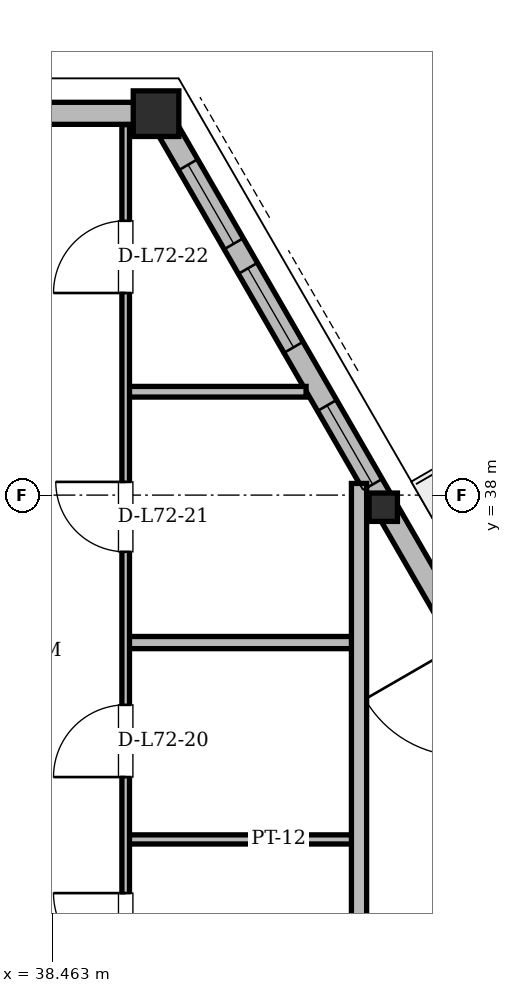
"""IFC4 building model, lengths in metres.
Left out: names, types, materials, properties, quantities, classifications, styles, units other than length and angle.
Written with IfcOpenShell. Run it as: python <this file> out.ifc"""

import sys

from ifc_helpers import new_model, si_unit, direction, frame, frame_2d, origin, origin_2d, place, context, subcontext, project, spatial, rectangle, hollow_rectangle, i_section, extrude, element, fill, save


model = new_model("IFC4")
c1 = context("Model", 3, precision=1e-05, world=origin(), true_north=direction((0.0, 1.0)))
c2 = subcontext(c1, "Body", "Model", "MODEL_VIEW")
j1 = project(units=[si_unit("LENGTHUNIT", "METRE"), si_unit("PLANEANGLEUNIT", "RADIAN")], contexts=[c1])
p1 = place(None, origin())
s1 = spatial("IfcSite", under=j1, at=p1, CompositionType="ELEMENT")
p2 = place(p1, origin())
s2 = spatial("IfcBuilding", under=s1, at=p2, CompositionType="ELEMENT")
p3 = place(p2, frame((0.0, 0.0, 273.3)))
s3 = spatial("IfcBuildingStorey", under=s2, at=p3, CompositionType="ELEMENT", Elevation=273.3)
p4 = place(p3, frame((39.861, 43.023, 0.004), z_axis=(-0.016060121522, -0.002446659138, 0.99986803447), x_axis=(0.150606094644, -0.988593852022, 0.0)))
e1 = element("IfcColumn", 1, at=p4, inside=s3, PredefinedType="COLUMN", context=c2, shape_type="SweptSolid", body=[
    extrude(hollow_rectangle(XDim=0.6, YDim=0.6, WallThickness=0.045, at=origin_2d()), origin(), (0.0, 0.0, 1.0), 3.892),
])
p5 = place(p3, frame((42.848, 37.848, 0.004), z_axis=(-0.01518196499, -0.004015065121, 0.999876685992), x_axis=(0.255672947806, -0.966763333893, 0.0)))
e2 = element("IfcColumn", 2, at=p5, inside=s3, PredefinedType="COLUMN", context=c2, shape_type="SweptSolid", body=[
    extrude(i_section(OverallWidth=0.373, OverallDepth=0.373, WebThickness=0.016, FlangeThickness=0.026, at=origin_2d()), origin(), (0.0, 0.0, 1.0), 3.892),
])
p6 = place(p3, frame((58.532, 10.683, 0.0), z_axis=(0.0, 0.0, 1.0), x_axis=(-0.499999381892, 0.866025760649, 0.0)))
e3 = element("IfcWall", 3, at=p6, inside=s3, PredefinedType="SOLIDWALL", context=c2, shape_type="SweptSolid", body=[
    extrude(rectangle(XDim=37.343, YDim=0.29, at=frame_2d((18.671, 0.0))), origin(), (0.0, 0.0, 1.0), 3.058),
])
p7 = place(p6, frame((6.789, 0.0, 0.0)))
e4 = element("IfcOpeningElement", 4, at=p7, cuts=e3, PredefinedType="OPENING", context=c2, shape_type="SweptSolid", body=[
    extrude(rectangle(XDim=1.5, YDim=2.2, at=frame_2d((0.75, 1.1))), frame((0.0, 0.145, 0.0), z_axis=(0.0, -1.0, 0.0), x_axis=(1.0, 0.0, 0.0)), (0.0, 0.0, 1.0), 0.29),
])
p8 = place(p6, frame((27.808, 0.0, 0.0)))
e5 = element("IfcOpeningElement", 5, at=p8, cuts=e3, PredefinedType="OPENING", context=c2, shape_type="SweptSolid", body=[
    extrude(rectangle(XDim=1.5, YDim=2.2, at=frame_2d((0.75, 1.1))), frame((0.0, 0.145, 0.0), z_axis=(0.0, -1.0, 0.0), x_axis=(1.0, 0.0, 0.0)), (0.0, 0.0, 1.0), 0.29),
])
p9 = place(p6, frame((0.901, 0.0, 0.85)))
e6 = element("IfcOpeningElement", 6, at=p9, cuts=e3, PredefinedType="OPENING", context=c2, shape_type="SweptSolid", body=[
    extrude(rectangle(XDim=1.2, YDim=1.48, at=frame_2d((0.6, 0.74))), frame((0.0, 0.145, 0.0), z_axis=(0.0, -1.0, 0.0), x_axis=(1.0, 0.0, 0.0)), (0.0, 0.0, 1.0), 0.29),
])
p10 = place(p6, frame((12.688, 0.0, 0.85)))
e7 = element("IfcOpeningElement", 7, at=p10, cuts=e3, PredefinedType="OPENING", context=c2, shape_type="SweptSolid", body=[
    extrude(rectangle(XDim=3.0, YDim=2.098, at=frame_2d((1.5, 1.049))), frame((0.0, 0.145, 0.0), z_axis=(0.0, -1.0, 0.0), x_axis=(1.0, 0.0, 0.0)), (0.0, 0.0, 1.0), 0.29),
])
p11 = place(p6, frame((17.814, 0.0, 0.85)))
e8 = element("IfcOpeningElement", 8, at=p11, cuts=e3, PredefinedType="OPENING", context=c2, shape_type="SweptSolid", body=[
    extrude(rectangle(XDim=2.6, YDim=1.95, at=frame_2d((1.3, 0.975))), frame((0.0, 0.145, 0.0), z_axis=(0.0, -1.0, 0.0), x_axis=(1.0, 0.0, 0.0)), (0.0, 0.0, 1.0), 0.29),
])
p12 = place(p6, frame((35.362, 0.0, 0.85)))
e9 = element("IfcOpeningElement", 9, at=p12, cuts=e3, PredefinedType="OPENING", context=c2, shape_type="SweptSolid", body=[
    extrude(rectangle(XDim=1.2, YDim=1.48, at=frame_2d((0.6, 0.74))), frame((0.0, 0.145, 0.0), z_axis=(0.0, -1.0, 0.0), x_axis=(1.0, 0.0, 0.0)), (0.0, 0.0, 1.0), 0.29),
])
p13 = place(p6, frame((33.788, 0.0, 0.85)))
e10 = element("IfcOpeningElement", 10, at=p13, cuts=e3, PredefinedType="OPENING", context=c2, shape_type="SweptSolid", body=[
    extrude(rectangle(XDim=1.2, YDim=1.48, at=frame_2d((0.6, 0.74))), frame((0.0, 0.145, 0.0), z_axis=(0.0, -1.0, 0.0), x_axis=(1.0, 0.0, 0.0)), (0.0, 0.0, 1.0), 0.29),
])
p14 = place(p6, frame((22.74, 0.0, 0.85)))
e11 = element("IfcOpeningElement", 11, at=p14, cuts=e3, PredefinedType="OPENING", context=c2, shape_type="SweptSolid", body=[
    extrude(rectangle(XDim=1.2, YDim=1.48, at=frame_2d((0.6, 0.74))), frame((0.0, 0.145, 0.0), z_axis=(0.0, -1.0, 0.0), x_axis=(1.0, 0.0, 0.0)), (0.0, 0.0, 1.0), 0.29),
])
p15 = place(p6, frame((31.705, 0.0, 0.85)))
e12 = element("IfcOpeningElement", 12, at=p15, cuts=e3, PredefinedType="OPENING", context=c2, shape_type="SweptSolid", body=[
    extrude(rectangle(XDim=1.2, YDim=1.48, at=frame_2d((0.6, 0.74))), frame((0.0, 0.145, 0.0), z_axis=(0.0, -1.0, 0.0), x_axis=(1.0, 0.0, 0.0)), (0.0, 0.0, 1.0), 0.29),
])
p16 = place(p3, frame((39.861, 43.023, 0.0), z_axis=(0.0, 0.0, 1.0), x_axis=(-1.0, 0.0, 0.0)))
e13 = element("IfcWall", 13, at=p16, inside=s3, PredefinedType="SOLIDWALL", context=c2, shape_type="SweptSolid", body=[
    extrude(rectangle(XDim=4.721, YDim=0.29, at=frame_2d((2.361, 0.0))), origin(), (0.0, 0.0, 1.0), 3.058),
])
p17 = place(p3, frame((39.43, 33.47, 0.0), z_axis=(0.0, 0.0, 1.0), x_axis=(1.0, 0.0, 0.0)))
e14 = element("IfcWall", 14, at=p17, inside=s3, PredefinedType="PARTITIONING", context=c2, shape_type="SweptSolid", body=[
    extrude(rectangle(XDim=3.12, YDim=0.12, at=frame_2d((1.56, 0.0))), origin(), (0.0, 0.0, 1.0), 3.68),
])
p18 = place(p3, frame((39.43, 36.06, 0.0), z_axis=(0.0, 0.0, 1.0), x_axis=(1.0, 0.0, 0.0)))
e15 = element("IfcWall", 15, at=p18, inside=s3, PredefinedType="PARTITIONING", context=c2, shape_type="SweptSolid", body=[
    extrude(rectangle(XDim=3.12, YDim=0.16, at=frame_2d((1.56, 0.0))), origin(), (0.0, 0.0, 1.0), 3.266),
])
p19 = place(p3, frame((39.43, 39.36, 0.0), z_axis=(0.0, 0.0, 1.0), x_axis=(1.0, 0.0, 0.0)))
e16 = element("IfcWall", 16, at=p19, inside=s3, PredefinedType="PARTITIONING", context=c2, shape_type="SweptSolid", body=[
    extrude(rectangle(XDim=2.374, YDim=0.14, at=frame_2d((1.187, 0.0))), origin(), (0.0, 0.0, 1.0), 3.266),
])
p20 = place(p3, frame((39.43, 26.074, 0.0), z_axis=(0.0, 0.0, 1.0), x_axis=(0.0, 1.0, 0.0)))
e17 = element("IfcWall", 17, at=p20, inside=s3, PredefinedType="PARTITIONING", context=c2, shape_type="SweptSolid", body=[
    extrude(rectangle(XDim=16.8, YDim=0.1, at=frame_2d((8.4, 0.0))), origin(), (0.0, 0.0, 1.0), 3.68),
])
p21 = place(p20, frame((0.486, 0.0, 0.0)))
e18 = element("IfcOpeningElement", 18, at=p21, cuts=e17, PredefinedType="OPENING", context=c2, shape_type="SweptSolid", body=[
    extrude(rectangle(XDim=0.88, YDim=2.08, at=frame_2d((0.44, 1.04))), frame((0.0, 0.05, 0.0), z_axis=(0.0, -1.0, 0.0), x_axis=(1.0, 0.0, 0.0)), (0.0, 0.0, 1.0), 0.1),
])
p22 = place(p20, frame((3.036, 0.0, 0.0)))
e19 = element("IfcOpeningElement", 19, at=p22, cuts=e17, PredefinedType="OPENING", context=c2, shape_type="SweptSolid", body=[
    extrude(rectangle(XDim=0.95, YDim=2.1, at=frame_2d((0.475, 1.05))), frame((0.0, 0.05, 0.0), z_axis=(0.0, -1.0, 0.0), x_axis=(1.0, 0.0, 0.0)), (0.0, 0.0, 1.0), 0.1),
])
p23 = place(p20, frame((5.74, 0.0, 0.0)))
e20 = element("IfcOpeningElement", 20, at=p23, cuts=e17, PredefinedType="OPENING", context=c2, shape_type="SweptSolid", body=[
    extrude(rectangle(XDim=0.95, YDim=2.1, at=frame_2d((0.475, 1.05))), frame((0.0, 0.05, 0.0), z_axis=(0.0, -1.0, 0.0), x_axis=(1.0, 0.0, 0.0)), (0.0, 0.0, 1.0), 0.1),
])
p24 = place(p20, frame((8.217, 0.0, 0.0)))
e21 = element("IfcOpeningElement", 21, at=p24, cuts=e17, PredefinedType="OPENING", context=c2, shape_type="SweptSolid", body=[
    extrude(rectangle(XDim=0.95, YDim=2.1, at=frame_2d((0.475, 1.05))), frame((0.0, 0.05, 0.0), z_axis=(0.0, -1.0, 0.0), x_axis=(1.0, 0.0, 0.0)), (0.0, 0.0, 1.0), 0.1),
])
p25 = place(p20, frame((11.18, 0.0, 0.0)))
e22 = element("IfcOpeningElement", 22, at=p25, cuts=e17, PredefinedType="OPENING", context=c2, shape_type="SweptSolid", body=[
    extrude(rectangle(XDim=0.92, YDim=2.12, at=frame_2d((0.46, 1.06))), frame((0.0, 0.05, 0.0), z_axis=(0.0, -1.0, 0.0), x_axis=(1.0, 0.0, 0.0)), (0.0, 0.0, 1.0), 0.1),
])
p26 = place(p20, frame((14.585, 0.0, 0.0)))
e23 = element("IfcOpeningElement", 23, at=p26, cuts=e17, PredefinedType="OPENING", context=c2, shape_type="SweptSolid", body=[
    extrude(rectangle(XDim=0.95, YDim=2.1, at=frame_2d((0.475, 1.05))), frame((0.0, 0.05, 0.0), z_axis=(0.0, -1.0, 0.0), x_axis=(1.0, 0.0, 0.0)), (0.0, 0.0, 1.0), 0.1),
])
p27 = place(p3, frame((42.5, 26.074, 0.0), z_axis=(0.0, 0.0, 1.0), x_axis=(0.0, 1.0, 0.0)))
e24 = element("IfcWall", 24, at=p27, inside=s3, PredefinedType="PARTITIONING", context=c2, shape_type="SweptSolid", body=[
    extrude(rectangle(XDim=12.08, YDim=0.2, at=frame_2d((6.04, 0.0))), origin(), (0.0, 0.0, 1.0), 3.058),
])
p28 = place(p12, origin())
e25 = element("IfcWindow", 25, at=p28, inside=s3, PartitioningType="SINGLE_PANEL", PredefinedType="WINDOW", context=c2, shape_type="SweptSolid", body=[
    extrude(rectangle(XDim=1.2, YDim=1.48, at=frame_2d((0.6, 0.74))), frame((0.0, 0.03, 0.0), z_axis=(0.0, -1.0, 0.0), x_axis=(1.0, 0.0, 0.0)), (0.0, 0.0, 1.0), 0.06),
])
fill(e9, e25)
p29 = place(p13, origin())
e26 = element("IfcWindow", 26, at=p29, inside=s3, PartitioningType="SINGLE_PANEL", PredefinedType="WINDOW", context=c2, shape_type="SweptSolid", body=[
    extrude(rectangle(XDim=1.2, YDim=1.48, at=frame_2d((0.6, 0.74))), frame((0.0, 0.03, 0.0), z_axis=(0.0, -1.0, 0.0), x_axis=(1.0, 0.0, 0.0)), (0.0, 0.0, 1.0), 0.06),
])
fill(e10, e26)
p30 = place(p15, origin())
e27 = element("IfcWindow", 27, at=p30, inside=s3, PartitioningType="SINGLE_PANEL", PredefinedType="WINDOW", context=c2, shape_type="SweptSolid", body=[
    extrude(rectangle(XDim=1.2, YDim=1.48, at=frame_2d((0.6, 0.74))), frame((0.0, 0.03, 0.0), z_axis=(0.0, -1.0, 0.0), x_axis=(1.0, 0.0, 0.0)), (0.0, 0.0, 1.0), 0.06),
])
fill(e12, e27)
p31 = place(p23, origin())
e28 = element("IfcDoor", 28, at=p31, inside=s3, OperationType="SINGLE_SWING_RIGHT", PredefinedType="DOOR", context=c2, shape_type="SweptSolid", body=[
    extrude(rectangle(XDim=0.95, YDim=2.1, at=frame_2d((0.475, 1.05))), frame((0.0, 0.025, 0.0), z_axis=(0.0, -1.0, 0.0), x_axis=(1.0, 0.0, 0.0)), (0.0, 0.0, 1.0), 0.05),
])
fill(e20, e28)
p32 = place(p24, origin())
e29 = element("IfcDoor", 29, at=p32, inside=s3, OperationType="SINGLE_SWING_LEFT", PredefinedType="DOOR", context=c2, shape_type="SweptSolid", body=[
    extrude(rectangle(XDim=0.95, YDim=2.1, at=frame_2d((0.475, 1.05))), frame((0.0, 0.025, 0.0), z_axis=(0.0, -1.0, 0.0), x_axis=(1.0, 0.0, 0.0)), (0.0, 0.0, 1.0), 0.05),
])
fill(e21, e29)
p33 = place(p25, origin())
e30 = element("IfcDoor", 30, at=p33, inside=s3, OperationType="SINGLE_SWING_RIGHT", PredefinedType="DOOR", context=c2, shape_type="SweptSolid", body=[
    extrude(rectangle(XDim=0.92, YDim=2.12, at=frame_2d((0.46, 1.06))), frame((0.0, 0.025, 0.0), z_axis=(0.0, -1.0, 0.0), x_axis=(1.0, 0.0, 0.0)), (0.0, 0.0, 1.0), 0.05),
])
fill(e22, e30)
p34 = place(p26, origin())
e31 = element("IfcDoor", 31, at=p34, inside=s3, OperationType="SINGLE_SWING_LEFT", PredefinedType="DOOR", context=c2, shape_type="SweptSolid", body=[
    extrude(rectangle(XDim=0.95, YDim=2.1, at=frame_2d((0.475, 1.05))), frame((0.0, 0.025, 0.0), z_axis=(0.0, -1.0, 0.0), x_axis=(1.0, 0.0, 0.0)), (0.0, 0.0, 1.0), 0.05),
])
fill(e23, e31)
save(model, sys.argv[1])
